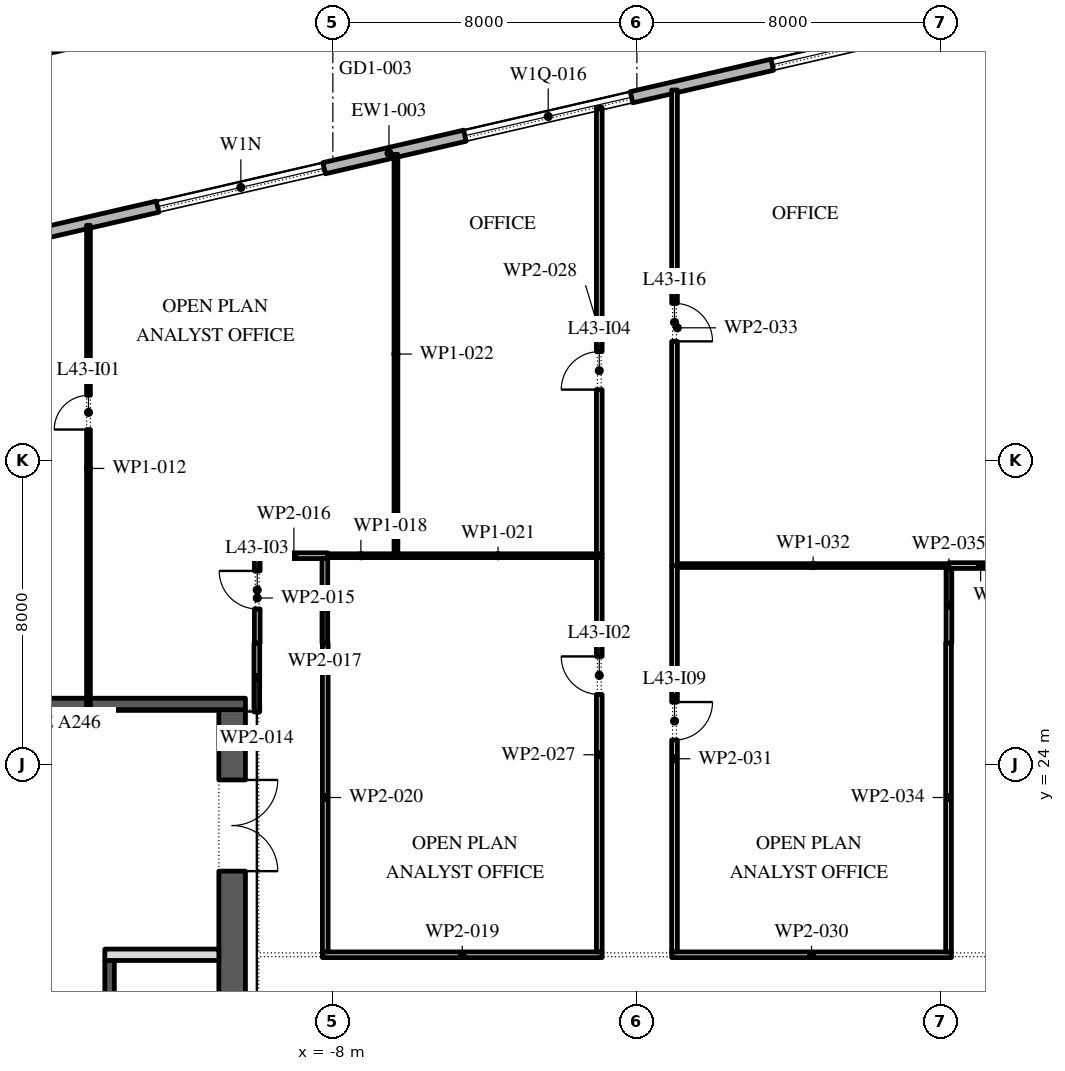
"""IFC4 building model, lengths in metres.
Left out: names, types, materials, properties, quantities, classifications, styles, units other than length and angle.
Written with IfcOpenShell. Run it as: python <this file> out.ifc"""

import sys

from ifc_helpers import new_model, si_unit, direction, frame, frame_2d, origin, place, context, subcontext, project, spatial, rectangle, extrude, element, fill, save


model = new_model("IFC4")
c1 = context("Model", 3, precision=1e-05, world=origin(), true_north=direction((0.0, 1.0)))
c2 = subcontext(c1, "Body", "Model", "MODEL_VIEW")
j1 = project(units=[si_unit("LENGTHUNIT", "METRE"), si_unit("PLANEANGLEUNIT", "RADIAN")], contexts=[c1])
p1 = place(None, origin())
s1 = spatial("IfcSite", under=j1, at=p1, CompositionType="ELEMENT")
p2 = place(p1, origin())
s2 = spatial("IfcBuilding", under=s1, at=p2, CompositionType="ELEMENT")
p3 = place(p2, frame((0.0, 0.0, 196.8)))
s3 = spatial("IfcBuildingStorey", under=s2, at=p3, CompositionType="ELEMENT", Elevation=196.8)
p4 = place(p3, frame((17.592, 45.657, 0.0), z_axis=(0.0, 0.0, 1.0), x_axis=(-0.974370243697, -0.224950279389, 0.0)))
e1 = element("IfcWall", 1, at=p4, inside=s3, PredefinedType="STANDARD", context=c2, shape_type="SweptSolid", body=[
    extrude(rectangle(XDim=49.5, YDim=0.3, at=frame_2d((24.75, 0.0))), origin(), (0.0, 0.0, 1.0), 4.0),
])
p5 = place(p4, frame((2.8, 0.0, 0.0)))
e2 = element("IfcOpeningElement", 2, at=p5, cuts=e1, PredefinedType="OPENING", context=c2, shape_type="SweptSolid", body=[
    extrude(rectangle(XDim=2.4, YDim=3.5, at=frame_2d((1.2, 1.75))), frame((0.0, 0.16, 0.0), z_axis=(0.0, -1.0, 0.0), x_axis=(1.0, 0.0, 0.0)), (0.0, 0.0, 1.0), 0.32),
])
p6 = place(p4, frame((9.9, 0.0, 0.45)))
e3 = element("IfcOpeningElement", 3, at=p6, cuts=e1, PredefinedType="OPENING", context=c2, shape_type="SweptSolid", body=[
    extrude(rectangle(XDim=4.5, YDim=2.45, at=frame_2d((2.25, 1.225))), frame((0.0, 0.16, 0.0), z_axis=(0.0, -1.0, 0.0), x_axis=(1.0, 0.0, 0.0)), (0.0, 0.0, 1.0), 0.32),
])
p7 = place(p4, frame((18.2, 0.0, 0.45)))
e4 = element("IfcOpeningElement", 4, at=p7, cuts=e1, PredefinedType="OPENING", context=c2, shape_type="SweptSolid", body=[
    extrude(rectangle(XDim=4.5, YDim=2.45, at=frame_2d((2.25, 1.225))), frame((0.0, 0.16, 0.0), z_axis=(0.0, -1.0, 0.0), x_axis=(1.0, 0.0, 0.0)), (0.0, 0.0, 1.0), 0.32),
])
p8 = place(p4, frame((26.5, 0.0, 0.45)))
e5 = element("IfcOpeningElement", 5, at=p8, cuts=e1, PredefinedType="OPENING", context=c2, shape_type="SweptSolid", body=[
    extrude(rectangle(XDim=4.5, YDim=2.525, at=frame_2d((2.25, 1.262))), frame((0.0, 0.16, 0.0), z_axis=(0.0, -1.0, 0.0), x_axis=(1.0, 0.0, 0.0)), (0.0, 0.0, 1.0), 0.32),
])
p9 = place(p4, frame((35.85, 0.0, 0.0)))
e6 = element("IfcOpeningElement", 6, at=p9, cuts=e1, PredefinedType="OPENING", context=c2, shape_type="SweptSolid", body=[
    extrude(rectangle(XDim=2.4, YDim=3.5, at=frame_2d((1.2, 1.75))), frame((0.0, 0.16, 0.0), z_axis=(0.0, -1.0, 0.0), x_axis=(1.0, 0.0, 0.0)), (0.0, 0.0, 1.0), 0.32),
])
p10 = place(p4, frame((43.1, 0.0, 0.45)))
e7 = element("IfcOpeningElement", 7, at=p10, cuts=e1, PredefinedType="OPENING", context=c2, shape_type="SweptSolid", body=[
    extrude(rectangle(XDim=4.5, YDim=2.675, at=frame_2d((2.25, 1.337))), frame((0.0, 0.16, 0.0), z_axis=(0.0, -1.0, 0.0), x_axis=(1.0, 0.0, 0.0)), (0.0, 0.0, 1.0), 0.32),
])
p11 = place(p3, frame((-10.65, -2.45, 0.0), z_axis=(0.0, 0.0, 1.0), x_axis=(0.0, 1.0, 0.0)))
e8 = element("IfcWall", 8, at=p11, inside=s3, PredefinedType="SHEAR", context=c2, shape_type="SweptSolid", body=[
    extrude(rectangle(XDim=27.9, YDim=0.7, at=frame_2d((13.95, 0.0))), origin(), (0.0, 0.0, 1.0), 4.0),
])
p12 = place(p11, frame((23.65, 0.0, 0.0)))
e9 = element("IfcOpeningElement", 9, at=p12, cuts=e8, PredefinedType="OPENING", context=c2, shape_type="SweptSolid", body=[
    extrude(rectangle(XDim=2.4, YDim=2.1, at=frame_2d((1.2, 1.05))), frame((0.0, 0.36, 0.0), z_axis=(0.0, -1.0, 0.0), x_axis=(1.0, 0.0, 0.0)), (0.0, 0.0, 1.0), 0.72),
])
p13 = place(p11, frame((1.387, 0.0, 0.0)))
e10 = element("IfcOpeningElement", 10, at=p13, cuts=e8, PredefinedType="OPENING", context=c2, shape_type="SweptSolid", body=[
    extrude(rectangle(XDim=0.9, YDim=2.1, at=frame_2d((0.45, 1.05))), frame((0.0, 0.36, 0.0), z_axis=(0.0, -1.0, 0.0), x_axis=(1.0, 0.0, 0.0)), (0.0, 0.0, 1.0), 0.72),
])
p14 = place(p11, frame((4.562, 0.0, 0.0)))
e11 = element("IfcOpeningElement", 11, at=p14, cuts=e8, PredefinedType="OPENING", context=c2, shape_type="SweptSolid", body=[
    extrude(rectangle(XDim=1.0, YDim=2.1, at=frame_2d((0.5, 1.05))), frame((0.0, 0.36, 0.0), z_axis=(0.0, -1.0, 0.0), x_axis=(1.0, 0.0, 0.0)), (0.0, 0.0, 1.0), 0.72),
])
p15 = place(p3, frame((-21.7, 25.6, 0.0), z_axis=(0.0, 0.0, 1.0), x_axis=(1.0, 0.0, 0.0)))
e12 = element("IfcWall", 12, at=p15, inside=s3, PredefinedType="SHEAR", context=c2, shape_type="SweptSolid", body=[
    extrude(rectangle(XDim=11.4, YDim=0.3, at=frame_2d((5.7, 0.0))), origin(), (0.0, 0.0, 1.0), 4.0),
])
p16 = place(p3, frame((-13.875, -2.45, 0.0), z_axis=(0.0, 0.0, 1.0), x_axis=(0.0, 1.0, 0.0)))
e13 = element("IfcWall", 13, at=p16, inside=s3, PredefinedType="SHEAR", context=c2, shape_type="SweptSolid", body=[
    extrude(rectangle(XDim=21.3, YDim=0.25, at=frame_2d((10.65, 0.0))), origin(), (0.0, 0.0, 1.0), 4.0),
])
p17 = place(p16, frame((17.786, 0.0, 0.0)))
e14 = element("IfcOpeningElement", 14, at=p17, cuts=e13, PredefinedType="OPENING", context=c2, shape_type="SweptSolid", body=[
    extrude(rectangle(XDim=0.9, YDim=2.1, at=frame_2d((0.45, 1.05))), frame((0.0, 0.135, 0.0), z_axis=(0.0, -1.0, 0.0), x_axis=(1.0, 0.0, 0.0)), (0.0, 0.0, 1.0), 0.27),
])
p18 = place(p16, frame((6.971, 0.0, 0.0)))
e15 = element("IfcOpeningElement", 15, at=p18, cuts=e13, PredefinedType="OPENING", context=c2, shape_type="SweptSolid", body=[
    extrude(rectangle(XDim=1.1, YDim=2.1, at=frame_2d((0.55, 1.05))), frame((0.0, 0.135, 0.0), z_axis=(0.0, -1.0, 0.0), x_axis=(1.0, 0.0, 0.0)), (0.0, 0.0, 1.0), 0.27),
])
p19 = place(p16, frame((9.114, 0.0, 0.0)))
e16 = element("IfcOpeningElement", 16, at=p19, cuts=e13, PredefinedType="OPENING", context=c2, shape_type="SweptSolid", body=[
    extrude(rectangle(XDim=1.1, YDim=2.1, at=frame_2d((0.55, 1.05))), frame((0.0, 0.135, 0.0), z_axis=(0.0, -1.0, 0.0), x_axis=(1.0, 0.0, 0.0)), (0.0, 0.0, 1.0), 0.27),
])
p20 = place(p16, frame((11.257, 0.0, 0.0)))
e17 = element("IfcOpeningElement", 17, at=p20, cuts=e13, PredefinedType="OPENING", context=c2, shape_type="SweptSolid", body=[
    extrude(rectangle(XDim=1.1, YDim=2.1, at=frame_2d((0.55, 1.05))), frame((0.0, 0.135, 0.0), z_axis=(0.0, -1.0, 0.0), x_axis=(1.0, 0.0, 0.0)), (0.0, 0.0, 1.0), 0.27),
])
p21 = place(p16, frame((13.4, 0.0, 0.0)))
e18 = element("IfcOpeningElement", 18, at=p21, cuts=e13, PredefinedType="OPENING", context=c2, shape_type="SweptSolid", body=[
    extrude(rectangle(XDim=1.1, YDim=2.1, at=frame_2d((0.55, 1.05))), frame((0.0, 0.135, 0.0), z_axis=(0.0, -1.0, 0.0), x_axis=(1.0, 0.0, 0.0)), (0.0, 0.0, 1.0), 0.27),
])
p22 = place(p3, frame((-14.0, 19.0, 0.0), z_axis=(0.0, 0.0, 1.0), x_axis=(1.0, 0.0, 0.0)))
e19 = element("IfcWall", 19, at=p22, inside=s3, PredefinedType="PARTITIONING", context=c2, shape_type="SweptSolid", body=[
    extrude(rectangle(XDim=3.0, YDim=0.3, at=frame_2d((1.5, 0.0))), origin(), (0.0, 0.0, 1.0), 4.0),
])
p23 = place(p3, frame((-14.43, 38.193, 0.0), z_axis=(0.0, 0.0, 1.0), x_axis=(0.0, -1.0, 0.0)))
e20 = element("IfcWall", 20, at=p23, inside=s3, PredefinedType="PARTITIONING", context=c2, shape_type="SweptSolid", body=[
    extrude(rectangle(XDim=12.793, YDim=0.1, at=frame_2d((6.396, 0.0))), origin(), (0.0, 0.0, 1.0), 4.0),
])
p24 = place(p23, frame((4.473, 0.0, 0.0)))
e21 = element("IfcOpeningElement", 21, at=p24, cuts=e20, PredefinedType="OPENING", context=c2, shape_type="SweptSolid", body=[
    extrude(rectangle(XDim=0.9, YDim=2.1, at=frame_2d((0.45, 1.05))), frame((0.0, 0.06, 0.0), z_axis=(0.0, -1.0, 0.0), x_axis=(1.0, 0.0, 0.0)), (0.0, 0.0, 1.0), 0.12),
])
p25 = place(p3, frame((-10.0, 25.39, 0.0), z_axis=(0.0, 0.0, 1.0), x_axis=(0.0, 1.0, 0.0)))
e22 = element("IfcWall", 22, at=p25, inside=s3, PredefinedType="PARTITIONING", context=c2, shape_type="SweptSolid", body=[
    extrude(rectangle(XDim=1.81, YDim=0.15, at=frame_2d((0.905, 0.0))), origin(), (0.0, 0.0, 1.0), 4.0),
])
p26 = place(p3, frame((-9.99, 27.2, 0.0), z_axis=(0.0, 0.0, 1.0), x_axis=(0.0, 1.0, 0.0)))
e23 = element("IfcWall", 23, at=p26, inside=s3, PredefinedType="PARTITIONING", context=c2, shape_type="SweptSolid", body=[
    extrude(rectangle(XDim=2.375, YDim=0.15, at=frame_2d((1.188, 0.0))), origin(), (0.0, 0.0, 1.0), 4.0),
])
p27 = place(p26, frame((0.9, 0.0, 0.0)))
e24 = element("IfcOpeningElement", 24, at=p27, cuts=e23, PredefinedType="OPENING", context=c2, shape_type="SweptSolid", body=[
    extrude(rectangle(XDim=1.0, YDim=2.1, at=frame_2d((0.5, 1.05))), frame((0.0, 0.085, 0.0), z_axis=(0.0, -1.0, 0.0), x_axis=(1.0, 0.0, 0.0)), (0.0, 0.0, 1.0), 0.17),
])
p28 = place(p3, frame((-9.915, 29.5, 0.0), z_axis=(0.0, 0.0, 1.0), x_axis=(1.0, 0.0, 0.0)))
e25 = element("IfcWall", 25, at=p28, inside=s3, PredefinedType="PARTITIONING", context=c2, shape_type="SweptSolid", body=[
    extrude(rectangle(XDim=1.78, YDim=0.15, at=frame_2d((0.89, 0.0))), origin(), (0.0, 0.0, 1.0), 4.0),
])
p29 = place(p3, frame((-8.21, 29.425, 0.0), z_axis=(0.0, 0.0, 1.0), x_axis=(0.0, -1.0, 0.0)))
e26 = element("IfcWall", 26, at=p29, inside=s3, PredefinedType="PARTITIONING", context=c2, shape_type="SweptSolid", body=[
    extrude(rectangle(XDim=2.225, YDim=0.15, at=frame_2d((1.113, 0.0))), origin(), (0.0, 0.0, 1.0), 4.0),
])
p30 = place(p3, frame((-8.135, 29.5, 0.0), z_axis=(0.0, 0.0, 1.0), x_axis=(1.0, 0.0, 0.0)))
e27 = element("IfcWall", 27, at=p30, inside=s3, PredefinedType="PARTITIONING", context=c2, shape_type="SweptSolid", body=[
    extrude(rectangle(XDim=1.745, YDim=0.1, at=frame_2d((0.873, 0.0))), origin(), (0.0, 0.0, 1.0), 4.0),
])
p31 = place(p3, frame((-8.275, 19.0, 0.0), z_axis=(0.0, 0.0, 1.0), x_axis=(1.0, 0.0, 0.0)))
e28 = element("IfcWall", 28, at=p31, inside=s3, PredefinedType="PARTITIONING", context=c2, shape_type="SweptSolid", body=[
    extrude(rectangle(XDim=7.36, YDim=0.15, at=frame_2d((3.68, 0.0))), origin(), (0.0, 0.0, 1.0), 4.0),
])
p32 = place(p3, frame((-8.2, 27.2, 0.0), z_axis=(0.0, 0.0, 1.0), x_axis=(0.0, -1.0, 0.0)))
e29 = element("IfcWall", 29, at=p32, inside=s3, PredefinedType="PARTITIONING", context=c2, shape_type="SweptSolid", body=[
    extrude(rectangle(XDim=8.125, YDim=0.15, at=frame_2d((4.062, 0.0))), origin(), (0.0, 0.0, 1.0), 4.0),
])
p33 = place(p3, frame((-6.39, 29.5, 0.0), z_axis=(0.0, 0.0, 1.0), x_axis=(1.0, 0.0, 0.0)))
e30 = element("IfcWall", 30, at=p33, inside=s3, PredefinedType="PARTITIONING", context=c2, shape_type="SweptSolid", body=[
    extrude(rectangle(XDim=5.475, YDim=0.1, at=frame_2d((2.737, 0.0))), origin(), (0.0, 0.0, 1.0), 4.0),
])
p34 = place(p3, frame((-6.34, 40.061, 0.0), z_axis=(0.0, 0.0, 1.0), x_axis=(0.0, -1.0, 0.0)))
e31 = element("IfcWall", 31, at=p34, inside=s3, PredefinedType="PARTITIONING", context=c2, shape_type="SweptSolid", body=[
    extrude(rectangle(XDim=10.511, YDim=0.1, at=frame_2d((5.255, 0.0))), origin(), (0.0, 0.0, 1.0), 4.0),
])
p35 = place(p3, frame((-0.99, 19.075, 0.0), z_axis=(0.0, 0.0, 1.0), x_axis=(0.0, 1.0, 0.0)))
e32 = element("IfcWall", 32, at=p35, inside=s3, PredefinedType="PARTITIONING", context=c2, shape_type="SweptSolid", body=[
    extrude(rectangle(XDim=10.375, YDim=0.15, at=frame_2d((5.188, 0.0))), origin(), (0.0, 0.0, 1.0), 4.0),
])
p36 = place(p35, frame((6.775, 0.0, 0.0)))
e33 = element("IfcOpeningElement", 33, at=p36, cuts=e32, PredefinedType="OPENING", context=c2, shape_type="SweptSolid", body=[
    extrude(rectangle(XDim=1.0, YDim=2.1, at=frame_2d((0.5, 1.05))), frame((0.0, 0.085, 0.0), z_axis=(0.0, -1.0, 0.0), x_axis=(1.0, 0.0, 0.0)), (0.0, 0.0, 1.0), 0.17),
])
p37 = place(p3, frame((-0.99, 29.55, 0.0), z_axis=(0.0, 0.0, 1.0), x_axis=(0.0, 1.0, 0.0)))
e34 = element("IfcWall", 34, at=p37, inside=s3, PredefinedType="PARTITIONING", context=c2, shape_type="SweptSolid", body=[
    extrude(rectangle(XDim=11.746, YDim=0.15, at=frame_2d((5.873, 0.0))), origin(), (0.0, 0.0, 1.0), 4.0),
])
p38 = place(p37, frame((4.32, 0.0, 0.0)))
e35 = element("IfcOpeningElement", 35, at=p38, cuts=e34, PredefinedType="OPENING", context=c2, shape_type="SweptSolid", body=[
    extrude(rectangle(XDim=1.0, YDim=2.1, at=frame_2d((0.5, 1.05))), frame((0.0, 0.085, 0.0), z_axis=(0.0, -1.0, 0.0), x_axis=(1.0, 0.0, 0.0)), (0.0, 0.0, 1.0), 0.17),
])
p39 = place(p3, frame((0.915, 19.0, 0.0), z_axis=(0.0, 0.0, 1.0), x_axis=(1.0, 0.0, 0.0)))
e36 = element("IfcWall", 36, at=p39, inside=s3, PredefinedType="PARTITIONING", context=c2, shape_type="SweptSolid", body=[
    extrude(rectangle(XDim=7.36, YDim=0.15, at=frame_2d((3.68, 0.0))), origin(), (0.0, 0.0, 1.0), 4.0),
])
p40 = place(p3, frame((0.99, 29.24, 0.0), z_axis=(0.0, 0.0, 1.0), x_axis=(0.0, -1.0, 0.0)))
e37 = element("IfcWall", 37, at=p40, inside=s3, PredefinedType="PARTITIONING", context=c2, shape_type="SweptSolid", body=[
    extrude(rectangle(XDim=10.165, YDim=0.15, at=frame_2d((5.083, 0.0))), origin(), (0.0, 0.0, 1.0), 4.0),
])
p41 = place(p40, frame((3.59, 0.0, 0.0)))
e38 = element("IfcOpeningElement", 38, at=p41, cuts=e37, PredefinedType="OPENING", context=c2, shape_type="SweptSolid", body=[
    extrude(rectangle(XDim=1.0, YDim=2.1, at=frame_2d((0.5, 1.05))), frame((0.0, 0.085, 0.0), z_axis=(0.0, -1.0, 0.0), x_axis=(1.0, 0.0, 0.0)), (0.0, 0.0, 1.0), 0.17),
])
p42 = place(p3, frame((1.065, 29.24, 0.0), z_axis=(0.0, 0.0, 1.0), x_axis=(1.0, 0.0, 0.0)))
e39 = element("IfcWall", 39, at=p42, inside=s3, PredefinedType="PARTITIONING", context=c2, shape_type="SweptSolid", body=[
    extrude(rectangle(XDim=7.145, YDim=0.1, at=frame_2d((3.573, 0.0))), origin(), (0.0, 0.0, 1.0), 4.0),
])
p43 = place(p3, frame((0.99, 41.753, 0.0), z_axis=(0.0, 0.0, 1.0), x_axis=(0.0, -1.0, 0.0)))
e40 = element("IfcWall", 40, at=p43, inside=s3, PredefinedType="PARTITIONING", context=c2, shape_type="SweptSolid", body=[
    extrude(rectangle(XDim=12.513, YDim=0.15, at=frame_2d((6.256, 0.0))), origin(), (0.0, 0.0, 1.0), 4.0),
])
p44 = place(p43, frame((5.613, 0.0, 0.0)))
e41 = element("IfcOpeningElement", 41, at=p44, cuts=e40, PredefinedType="OPENING", context=c2, shape_type="SweptSolid", body=[
    extrude(rectangle(XDim=1.0, YDim=2.1, at=frame_2d((0.5, 1.05))), frame((0.0, 0.085, 0.0), z_axis=(0.0, -1.0, 0.0), x_axis=(1.0, 0.0, 0.0)), (0.0, 0.0, 1.0), 0.17),
])
p45 = place(p3, frame((8.2, 19.075, 0.0), z_axis=(0.0, 0.0, 1.0), x_axis=(0.0, 1.0, 0.0)))
e42 = element("IfcWall", 42, at=p45, inside=s3, PredefinedType="PARTITIONING", context=c2, shape_type="SweptSolid", body=[
    extrude(rectangle(XDim=8.125, YDim=0.15, at=frame_2d((4.062, 0.0))), origin(), (0.0, 0.0, 1.0), 4.0),
])
p46 = place(p3, frame((8.21, 27.2, 0.0), z_axis=(0.0, 0.0, 1.0), x_axis=(0.0, 1.0, 0.0)))
e43 = element("IfcWall", 43, at=p46, inside=s3, PredefinedType="PARTITIONING", context=c2, shape_type="SweptSolid", body=[
    extrude(rectangle(XDim=1.99, YDim=0.15, at=frame_2d((0.995, 0.0))), origin(), (0.0, 0.0, 1.0), 4.0),
])
p47 = place(p3, frame((8.21, 29.24, 0.0), z_axis=(0.0, 0.0, 1.0), x_axis=(1.0, 0.0, 0.0)))
e44 = element("IfcWall", 44, at=p47, inside=s3, PredefinedType="PARTITIONING", context=c2, shape_type="SweptSolid", body=[
    extrude(rectangle(XDim=1.67, YDim=0.15, at=frame_2d((0.835, 0.0))), origin(), (0.0, 0.0, 1.0), 4.0),
])
p48 = place(p6, origin())
e45 = element("IfcWindow", 45, at=p48, inside=s3, PartitioningType="DOUBLE_PANEL_VERTICAL", PredefinedType="WINDOW", context=c2, shape_type="SweptSolid", body=[
    extrude(rectangle(XDim=4.5, YDim=2.45, at=frame_2d((2.25, 1.225))), frame((0.0, 0.03, 0.0), z_axis=(0.0, -1.0, 0.0), x_axis=(1.0, 0.0, 0.0)), (0.0, 0.0, 1.0), 0.06),
])
fill(e3, e45)
p49 = place(p7, origin())
e46 = element("IfcWindow", 46, at=p49, inside=s3, PartitioningType="DOUBLE_PANEL_VERTICAL", PredefinedType="WINDOW", context=c2, shape_type="SweptSolid", body=[
    extrude(rectangle(XDim=4.5, YDim=2.45, at=frame_2d((2.25, 1.225))), frame((0.0, 0.03, 0.0), z_axis=(0.0, -1.0, 0.0), x_axis=(1.0, 0.0, 0.0)), (0.0, 0.0, 1.0), 0.06),
])
fill(e4, e46)
p50 = place(p8, origin())
e47 = element("IfcWindow", 47, at=p50, inside=s3, PartitioningType="DOUBLE_PANEL_VERTICAL", PredefinedType="WINDOW", context=c2, shape_type="SweptSolid", body=[
    extrude(rectangle(XDim=4.5, YDim=2.525, at=frame_2d((2.25, 1.262))), frame((0.0, 0.03, 0.0), z_axis=(0.0, -1.0, 0.0), x_axis=(1.0, 0.0, 0.0)), (0.0, 0.0, 1.0), 0.06),
])
fill(e5, e47)
p51 = place(p12, frame((2.4, 0.0, 0.0), z_axis=(0.0, 0.0, 1.0), x_axis=(-1.0, 0.0, 0.0)))
e48 = element("IfcDoor", 48, at=p51, inside=s3, OperationType="DOUBLE_DOOR_SINGLE_SWING", PredefinedType="DOOR", context=c2, shape_type="SweptSolid", body=[
    extrude(rectangle(XDim=2.4, YDim=2.1, at=frame_2d((1.2, 1.05))), frame((0.0, 0.025, 0.0), z_axis=(0.0, -1.0, 0.0), x_axis=(1.0, 0.0, 0.0)), (0.0, 0.0, 1.0), 0.05),
])
fill(e9, e48)
p52 = place(p24, frame((0.9, 0.0, 0.0), z_axis=(0.0, 0.0, 1.0), x_axis=(-1.0, 0.0, 0.0)))
e49 = element("IfcDoor", 49, at=p52, inside=s3, OperationType="SINGLE_SWING_RIGHT", PredefinedType="DOOR", context=c2, shape_type="SweptSolid", body=[
    extrude(rectangle(XDim=0.9, YDim=2.1, at=frame_2d((0.45, 1.05))), frame((0.0, 0.025, 0.0), z_axis=(0.0, -1.0, 0.0), x_axis=(1.0, 0.0, 0.0)), (0.0, 0.0, 1.0), 0.05),
])
fill(e21, e49)
p53 = place(p36, origin())
e50 = element("IfcDoor", 50, at=p53, inside=s3, OperationType="SINGLE_SWING_LEFT", PredefinedType="DOOR", context=c2, shape_type="SweptSolid", body=[
    extrude(rectangle(XDim=1.0, YDim=2.1, at=frame_2d((0.5, 1.05))), frame((0.0, 0.025, 0.0), z_axis=(0.0, -1.0, 0.0), x_axis=(1.0, 0.0, 0.0)), (0.0, 0.0, 1.0), 0.05),
])
fill(e33, e50)
p54 = place(p27, origin())
e51 = element("IfcDoor", 51, at=p54, inside=s3, OperationType="SINGLE_SWING_LEFT", PredefinedType="DOOR", context=c2, shape_type="SweptSolid", body=[
    extrude(rectangle(XDim=1.0, YDim=2.1, at=frame_2d((0.5, 1.05))), frame((0.0, 0.025, 0.0), z_axis=(0.0, -1.0, 0.0), x_axis=(1.0, 0.0, 0.0)), (0.0, 0.0, 1.0), 0.05),
])
fill(e24, e51)
p55 = place(p38, origin())
e52 = element("IfcDoor", 52, at=p55, inside=s3, OperationType="SINGLE_SWING_RIGHT", PredefinedType="DOOR", context=c2, shape_type="SweptSolid", body=[
    extrude(rectangle(XDim=1.0, YDim=2.1, at=frame_2d((0.5, 1.05))), frame((0.0, 0.025, 0.0), z_axis=(0.0, -1.0, 0.0), x_axis=(1.0, 0.0, 0.0)), (0.0, 0.0, 1.0), 0.05),
])
fill(e35, e52)
p56 = place(p41, origin())
e53 = element("IfcDoor", 53, at=p56, inside=s3, OperationType="SINGLE_SWING_RIGHT", PredefinedType="DOOR", context=c2, shape_type="SweptSolid", body=[
    extrude(rectangle(XDim=1.0, YDim=2.1, at=frame_2d((0.5, 1.05))), frame((0.0, 0.025, 0.0), z_axis=(0.0, -1.0, 0.0), x_axis=(1.0, 0.0, 0.0)), (0.0, 0.0, 1.0), 0.05),
])
fill(e38, e53)
p57 = place(p44, origin())
e54 = element("IfcDoor", 54, at=p57, inside=s3, OperationType="SINGLE_SWING_LEFT", PredefinedType="DOOR", context=c2, shape_type="SweptSolid", body=[
    extrude(rectangle(XDim=1.0, YDim=2.1, at=frame_2d((0.5, 1.05))), frame((0.0, 0.025, 0.0), z_axis=(0.0, -1.0, 0.0), x_axis=(1.0, 0.0, 0.0)), (0.0, 0.0, 1.0), 0.05),
])
fill(e41, e54)
save(model, sys.argv[1])
